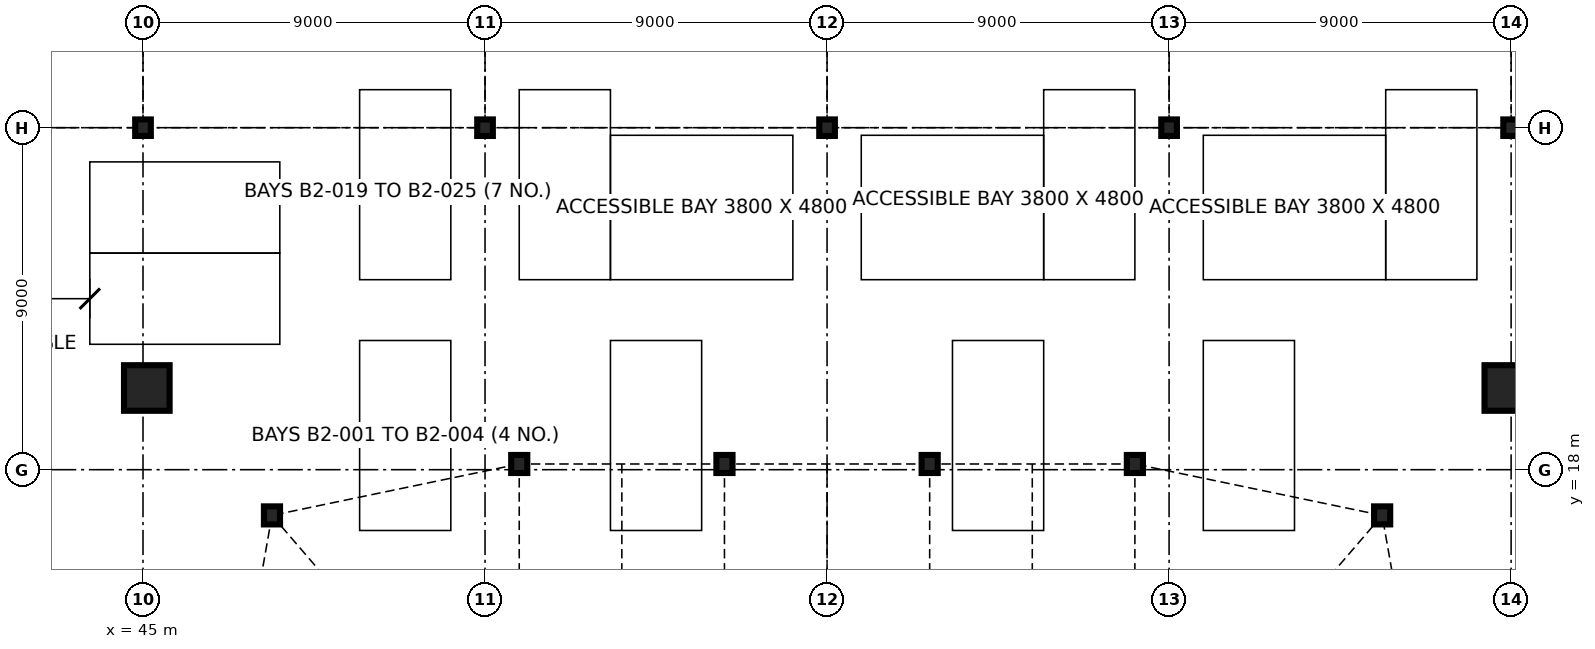
"""IFC4 building model, lengths in metres.
Left out: names, types, materials, properties, quantities, classifications, styles, units other than length and angle.
Written with IfcOpenShell. Run it as: python <this file> out.ifc"""

import sys

from ifc_helpers import new_model, si_unit, direction, frame, origin, origin_2d, place, context, subcontext, project, spatial, hollow_rectangle, i_section, extrude, element, save


model = new_model("IFC4")
c1 = context("Model", 3, precision=1e-05, world=origin(), true_north=direction((0.0, 1.0)))
c2 = subcontext(c1, "Body", "Model", "MODEL_VIEW")
j1 = project(units=[si_unit("LENGTHUNIT", "METRE"), si_unit("PLANEANGLEUNIT", "RADIAN")], contexts=[c1])
p1 = place(None, origin())
s1 = spatial("IfcSite", under=j1, at=p1, CompositionType="ELEMENT")
p2 = place(p1, origin())
s2 = spatial("IfcBuilding", under=s1, at=p2, CompositionType="ELEMENT")
p3 = place(p2, frame((0.0, 0.0, -7.2)))
s3 = spatial("IfcBuildingStorey", under=s2, at=p3, CompositionType="ELEMENT", Elevation=-7.2)
for number, where, z_axis, x_axis in (
    (1, (77.606, 16.797, -0.25), (0.0, 0.0, 1.0), (1.0, 0.0, 0.0)),
    (2, (71.1, 18.15, -0.25), (0.0, 0.0, 1.0), (1.0, 0.0, 0.0)),
    (3, (65.7, 18.15, -0.25), (0.0, 0.0, 1.0), (1.0, 0.0, 0.0)),
    (4, (60.3, 18.15, -0.25), (0.0, 0.0, 1.0), (1.0, 0.0, 0.0)),
    (5, (54.9, 18.15, -0.25), (0.0, 0.0, 1.0), (1.0, 0.0, 0.0)),
    (6, (48.394, 16.797, -0.25), (0.0, 0.0, 1.0), (1.0, 0.0, 0.0)),
):
    element("IfcColumn", number, at=place(p3, frame(where, z_axis=z_axis, x_axis=x_axis)), inside=s3, PredefinedType="COLUMN", context=c2, shape_type="SweptSolid", body=[
        extrude(i_section(OverallWidth=0.424, OverallDepth=0.475, WebThickness=0.048, FlangeThickness=0.077, at=origin_2d()), origin(), (0.0, 0.0, 1.0), 3.85),
    ])
for number, where, z_axis, x_axis in (
    (7, (80.9, 20.15, -0.25), (0.0, 0.0, 1.0), (1.0, 0.0, 0.0)),
    (8, (45.1, 20.15, -0.25), (0.0, 0.0, 1.0), (1.0, 0.0, 0.0)),
):
    element("IfcColumn", number, at=place(p3, frame(where, z_axis=z_axis, x_axis=x_axis)), inside=s3, PredefinedType="COLUMN", context=c2, shape_type="SweptSolid", body=[
        extrude(hollow_rectangle(XDim=1.2, YDim=1.2, WallThickness=0.07, at=origin_2d()), origin(), (0.0, 0.0, 1.0), 3.85),
    ])
for number, where, z_axis, x_axis in (
    (9, (45.0, 27.0, -0.25), (0.0, 0.0, 1.0), (1.0, 0.0, 0.0)),
    (10, (54.0, 27.0, -0.25), (0.0, 0.0, 1.0), (1.0, 0.0, 0.0)),
    (11, (63.0, 27.0, -0.25), (0.0, 0.0, 1.0), (1.0, 0.0, 0.0)),
    (12, (72.0, 27.0, -0.25), (0.0, 0.0, 1.0), (1.0, 0.0, 0.0)),
    (13, (81.0, 27.0, -0.25), (0.0, 0.0, 1.0), (1.0, 0.0, 0.0)),
):
    element("IfcColumn", number, at=place(p3, frame(where, z_axis=z_axis, x_axis=x_axis)), inside=s3, PredefinedType="COLUMN", context=c2, shape_type="SweptSolid", body=[
        extrude(i_section(OverallWidth=0.411, OverallDepth=0.434, WebThickness=0.036, FlangeThickness=0.057, at=origin_2d()), origin(), (0.0, 0.0, 1.0), 3.85),
    ])
save(model, sys.argv[1])
